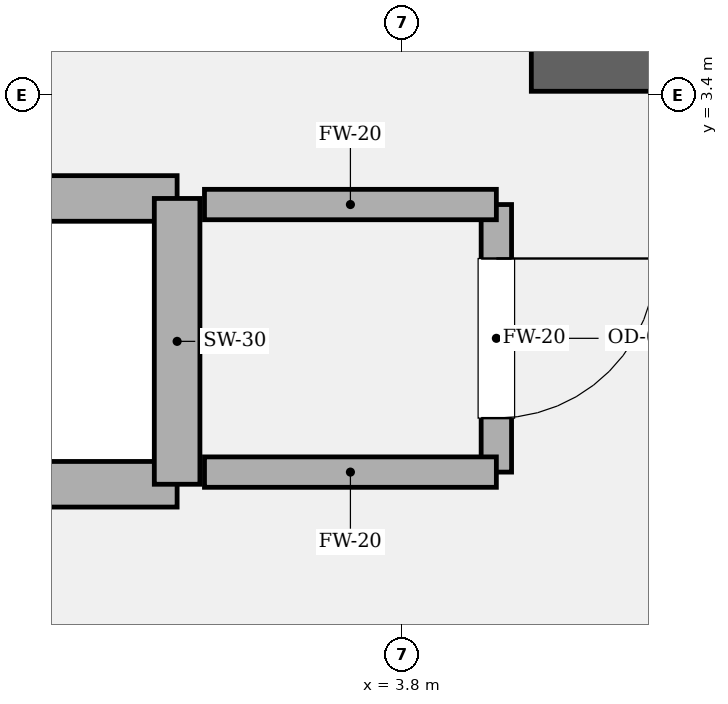
"""IFC4 building model, lengths in metres.
Left out: names, types, materials, properties, quantities, classifications, styles, units other than length and angle.
Written with IfcOpenShell. Run it as: python <this file> out.ifc"""

import sys

from ifc_helpers import new_model, si_unit, direction, frame, frame_2d, origin, place, context, subcontext, project, spatial, rectangle, extrude, element, fill, save


model = new_model("IFC4")
c1 = context("Model", 3, precision=1e-05, world=origin(), true_north=direction((0.0, 1.0)))
c2 = subcontext(c1, "Body", "Model", "MODEL_VIEW")
j1 = project(units=[si_unit("LENGTHUNIT", "METRE"), si_unit("PLANEANGLEUNIT", "RADIAN")], contexts=[c1])
p1 = place(None, origin())
s1 = spatial("IfcSite", under=j1, at=p1, CompositionType="ELEMENT")
p2 = place(p1, origin())
s2 = spatial("IfcBuilding", under=s1, at=p2, CompositionType="ELEMENT")
p3 = place(p2, frame((0.0, 0.0, 267.6)))
s3 = spatial("IfcBuildingStorey", under=s2, at=p3, CompositionType="ELEMENT", Elevation=267.6)
p4 = place(p3, frame((4.65, 3.6, 0.0), z_axis=(0.0, 0.0, 1.0), x_axis=(1.0, 0.0, 0.0)))
e1 = element("IfcWall", 1, at=p4, inside=s3, PredefinedType="SOLIDWALL", context=c2, shape_type="SweptSolid", body=[
    extrude(rectangle(XDim=5.275, YDim=0.35, at=frame_2d((2.638, 0.0))), origin(), (0.0, 0.0, 1.0), 4.05),
])
for number, where, z_axis, x_axis in (
    (2, (-2.32, 0.84, 0.0), (0.0, 0.0, 1.0), (1.0, 0.0, 0.0)),
    (3, (-2.32, 2.72, 0.0), (0.0, 0.0, 1.0), (1.0, 0.0, 0.0)),
):
    element("IfcWall", number, at=place(p3, frame(where, z_axis=z_axis, x_axis=x_axis)), inside=s3, PredefinedType="SOLIDWALL", context=c2, shape_type="SweptSolid", body=[
        extrude(rectangle(XDim=4.64, YDim=0.3, at=frame_2d((2.32, 0.0))), origin(), (0.0, 0.0, 1.0), 3.85),
    ])
p5 = place(p3, frame((2.32, 0.84, 0.0), z_axis=(0.0, 0.0, 1.0), x_axis=(0.0, 1.0, 0.0)))
e4 = element("IfcWall", 4, at=p5, inside=s3, PredefinedType="SOLIDWALL", context=c2, shape_type="SweptSolid", body=[
    extrude(rectangle(XDim=1.88, YDim=0.3, at=frame_2d((0.94, 0.0))), origin(), (0.0, 0.0, 1.0), 3.85),
])
p6 = place(p3, frame((4.42, 0.92, 0.0), z_axis=(0.0, 0.0, 1.0), x_axis=(0.0, 1.0, 0.0)))
e5 = element("IfcWall", 5, at=p6, inside=s3, PredefinedType="SOLIDWALL", context=c2, shape_type="SweptSolid", body=[
    extrude(rectangle(XDim=1.76, YDim=0.2, at=frame_2d((0.88, 0.0))), origin(), (0.0, 0.0, 1.0), 3.85),
])
p7 = place(p6, frame((0.355, 0.0, 0.0)))
e6 = element("IfcOpeningElement", 6, at=p7, cuts=e5, PredefinedType="OPENING", context=c2, shape_type="SweptSolid", body=[
    extrude(rectangle(XDim=1.05, YDim=2.2, at=frame_2d((0.525, 1.1))), frame((0.0, 0.11, 0.0), z_axis=(0.0, -1.0, 0.0), x_axis=(1.0, 0.0, 0.0)), (0.0, 0.0, 1.0), 0.22),
])
for number, where, z_axis, x_axis in (
    (7, (4.42, 2.68, 0.0), (0.0, 0.0, 1.0), (-1.0, 0.0, 0.0)),
    (8, (2.5, 0.92, 0.0), (0.0, 0.0, 1.0), (1.0, 0.0, 0.0)),
):
    element("IfcWall", number, at=place(p3, frame(where, z_axis=z_axis, x_axis=x_axis)), inside=s3, PredefinedType="SOLIDWALL", context=c2, shape_type="SweptSolid", body=[
        extrude(rectangle(XDim=1.92, YDim=0.2, at=frame_2d((0.96, 0.0))), origin(), (0.0, 0.0, 1.0), 3.85),
    ])
p8 = place(p7, origin())
e9 = element("IfcDoor", 9, at=p8, inside=s3, OperationType="SINGLE_SWING_RIGHT", PredefinedType="DOOR", context=c2, shape_type="SweptSolid", body=[
    extrude(rectangle(XDim=1.05, YDim=2.2, at=frame_2d((0.525, 1.1))), frame((0.0, 0.025, 0.0), z_axis=(0.0, -1.0, 0.0), x_axis=(1.0, 0.0, 0.0)), (0.0, 0.0, 1.0), 0.05),
])
fill(e6, e9)
save(model, sys.argv[1])
